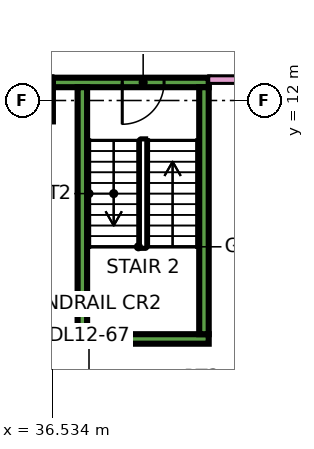
"""IFC4 building model, lengths in metres.
Left out: names, types, materials, properties, quantities, classifications, styles, units other than length and angle.
Written with IfcOpenShell. Run it as: python <this file> out.ifc"""

import sys

from ifc_helpers import new_model, si_unit, direction, frame, frame_2d, origin, origin_2d, place, context, subcontext, project, spatial, rectangle, extrude, element, fill, save


model = new_model("IFC4")
c1 = context("Model", 3, precision=1e-05, world=origin(), true_north=direction((0.0, 1.0)))
c2 = subcontext(c1, "Body", "Model", "MODEL_VIEW")
j1 = project(units=[si_unit("LENGTHUNIT", "METRE"), si_unit("PLANEANGLEUNIT", "RADIAN")], contexts=[c1])
p1 = place(None, origin())
s1 = spatial("IfcSite", under=j1, at=p1, CompositionType="ELEMENT")
p2 = place(p1, origin())
s2 = spatial("IfcBuilding", under=s1, at=p2, CompositionType="ELEMENT")
p3 = place(p2, frame((0.0, 0.0, 60.15)))
s3 = spatial("IfcBuildingStorey", under=s2, at=p3, CompositionType="ELEMENT", Elevation=60.15)
p4 = place(p3, frame((36.0, 12.0, 0.0), z_axis=(0.0, 0.0, 1.0), x_axis=(1.0, 0.0, 0.0)))
e1 = element("IfcColumn", 1, at=p4, inside=s3, PredefinedType="COLUMN", context=c2, shape_type="SweptSolid", body=[
    extrude(rectangle(XDim=1.1, YDim=1.1, at=origin_2d()), origin(), (0.0, 0.0, 1.0), 3.75),
])
p5 = place(p3, frame((37.2, 5.725, 0.0), z_axis=(0.0, 0.0, 1.0), x_axis=(1.0, 0.0, 0.0)))
e2 = element("IfcWall", 2, at=p5, inside=s3, PredefinedType="SHEAR", context=c2, shape_type="SweptSolid", body=[
    extrude(rectangle(XDim=3.45, YDim=0.25, at=frame_2d((1.725, 0.0))), origin(), (0.0, 0.0, 1.0), 3.75),
])
p6 = place(p3, frame((36.55, 12.475, 0.0), z_axis=(0.0, 0.0, 1.0), x_axis=(1.0, 0.0, 0.0)))
e3 = element("IfcWall", 3, at=p6, inside=s3, PredefinedType="SHEAR", context=c2, shape_type="SweptSolid", body=[
    extrude(rectangle(XDim=4.1, YDim=0.25, at=frame_2d((2.05, 0.0))), origin(), (0.0, 0.0, 1.0), 3.75),
])
p7 = place(p6, frame((1.825, 0.0, 0.0)))
e4 = element("IfcOpeningElement", 4, at=p7, cuts=e3, PredefinedType="OPENING", context=c2, shape_type="SweptSolid", body=[
    extrude(rectangle(XDim=1.1, YDim=2.2, at=frame_2d((0.55, 1.1))), frame((0.0, 0.135, 0.0), z_axis=(0.0, -1.0, 0.0), x_axis=(1.0, 0.0, 0.0)), (0.0, 0.0, 1.0), 0.27),
])
for number, where, z_axis, x_axis in (
    (5, (37.325, 5.85, 0.0), (0.0, 0.0, 1.0), (0.0, 1.0, 0.0)),
    (6, (40.525, 5.85, 0.0), (0.0, 0.0, 1.0), (0.0, 1.0, 0.0)),
):
    element("IfcWall", number, at=place(p3, frame(where, z_axis=z_axis, x_axis=x_axis)), inside=s3, PredefinedType="SHEAR", context=c2, shape_type="SweptSolid", body=[
        extrude(rectangle(XDim=6.5, YDim=0.25, at=frame_2d((3.25, 0.0))), origin(), (0.0, 0.0, 1.0), 3.75),
    ])
p8 = place(p3, frame((34.0, 12.55, 0.0), z_axis=(0.0, 0.0, 1.0), x_axis=(1.0, 0.0, 0.0)))
e7 = element("IfcWall", 7, at=p8, inside=s3, PredefinedType="PARTITIONING", context=c2, shape_type="SweptSolid", body=[
    extrude(rectangle(XDim=2.551, YDim=0.2, at=frame_2d((1.275, 0.0))), origin(), (0.0, 0.0, 1.0), 3.35),
])
p9 = place(p3, frame((40.65, 12.55, 0.0), z_axis=(0.0, 0.0, 1.0), x_axis=(1.0, 0.0, 0.0)))
e8 = element("IfcWall", 8, at=p9, inside=s3, PredefinedType="PARTITIONING", context=c2, shape_type="SweptSolid", body=[
    extrude(rectangle(XDim=31.276, YDim=0.2, at=frame_2d((15.638, 0.0))), origin(), (0.0, 0.0, 1.0), 3.35),
])
p10 = place(p9, frame((8.4, 0.0, 0.0)))
e9 = element("IfcOpeningElement", 9, at=p10, cuts=e8, PredefinedType="OPENING", context=c2, shape_type="SweptSolid", body=[
    extrude(rectangle(XDim=1.0, YDim=2.1, at=frame_2d((0.5, 1.05))), frame((0.0, 0.11, 0.0), z_axis=(0.0, -1.0, 0.0), x_axis=(1.0, 0.0, 0.0)), (0.0, 0.0, 1.0), 0.22),
])
p11 = place(p9, frame((29.7, 0.0, 0.0)))
e10 = element("IfcOpeningElement", 10, at=p11, cuts=e8, PredefinedType="OPENING", context=c2, shape_type="SweptSolid", body=[
    extrude(rectangle(XDim=1.0, YDim=2.1, at=frame_2d((0.5, 1.05))), frame((0.0, 0.11, 0.0), z_axis=(0.0, -1.0, 0.0), x_axis=(1.0, 0.0, 0.0)), (0.0, 0.0, 1.0), 0.22),
])
p12 = place(p9, frame((1.05, 0.0, 0.0)))
e11 = element("IfcOpeningElement", 11, at=p12, cuts=e8, PredefinedType="OPENING", context=c2, shape_type="SweptSolid", body=[
    extrude(rectangle(XDim=1.0, YDim=2.1, at=frame_2d((0.5, 1.05))), frame((0.0, 0.11, 0.0), z_axis=(0.0, -1.0, 0.0), x_axis=(1.0, 0.0, 0.0)), (0.0, 0.0, 1.0), 0.22),
])
p13 = place(p7, frame((1.1, 0.0, 0.0), z_axis=(0.0, 0.0, 1.0), x_axis=(-1.0, 0.0, 0.0)))
e12 = element("IfcDoor", 12, at=p13, inside=s3, OperationType="SINGLE_SWING_LEFT", PredefinedType="DOOR", context=c2, shape_type="SweptSolid", body=[
    extrude(rectangle(XDim=1.1, YDim=2.2, at=frame_2d((0.55, 1.1))), frame((0.0, 0.025, 0.0), z_axis=(0.0, -1.0, 0.0), x_axis=(1.0, 0.0, 0.0)), (0.0, 0.0, 1.0), 0.05),
])
fill(e4, e12)
save(model, sys.argv[1])
